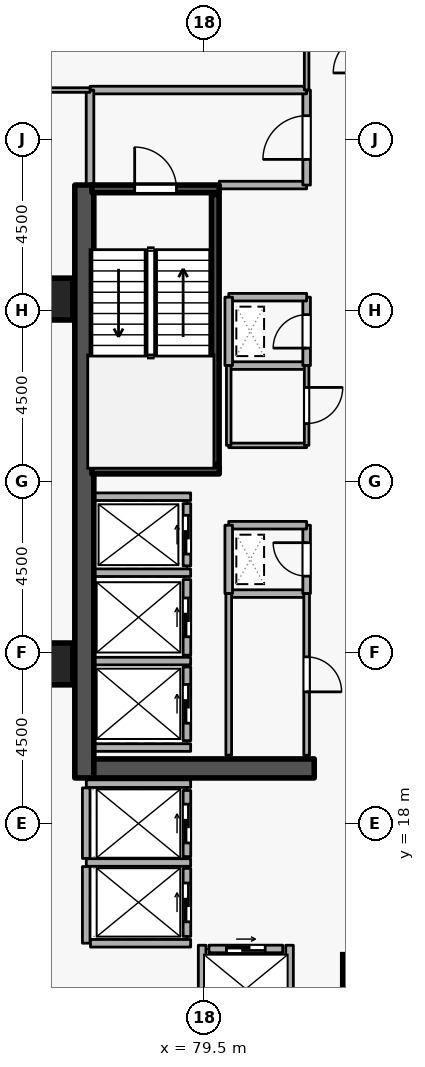
"""IFC4 building model, lengths in metres.
Left out: names, types, materials, properties, quantities, classifications, styles, units other than length and angle.
Written with IfcOpenShell. Run it as: python <this file> out.ifc"""

import sys

from ifc_helpers import new_model, si_unit, direction, frame, frame_2d, origin, origin_2d, place, context, subcontext, project, spatial, rectangle, extrude, element, fill, save


model = new_model("IFC4")
c1 = context("Model", 3, precision=1e-05, world=origin(), true_north=direction((0.0, 1.0)))
c2 = subcontext(c1, "Body", "Model", "MODEL_VIEW")
j1 = project(units=[si_unit("LENGTHUNIT", "METRE"), si_unit("PLANEANGLEUNIT", "RADIAN")], contexts=[c1])
p1 = place(None, origin())
s1 = spatial("IfcSite", under=j1, at=p1, CompositionType="ELEMENT")
p2 = place(p1, origin())
s2 = spatial("IfcBuilding", under=s1, at=p2, CompositionType="ELEMENT")
p3 = place(p2, frame((0.0, 0.0, 192.9)))
s3 = spatial("IfcBuildingStorey", under=s2, at=p3, CompositionType="ELEMENT", Elevation=192.9)
p4 = place(p3, frame((76.35, 19.2, 0.0), z_axis=(0.0, 0.0, 1.0), x_axis=(0.0, 1.0, 0.0)))
e1 = element("IfcWall", 1, at=p4, inside=s3, PredefinedType="SHEAR", context=c2, shape_type="SweptSolid", body=[
    extrude(rectangle(XDim=15.6, YDim=0.5, at=frame_2d((7.8, 0.0))), origin(), (0.0, 0.0, 1.0), 3.6),
])
p5 = place(p3, frame((76.6, 19.45, 0.0), z_axis=(0.0, 0.0, 1.0), x_axis=(1.0, 0.0, 0.0)))
e2 = element("IfcWall", 2, at=p5, inside=s3, PredefinedType="SHEAR", context=c2, shape_type="SweptSolid", body=[
    extrude(rectangle(XDim=5.8, YDim=0.5, at=frame_2d((2.9, 0.0))), origin(), (0.0, 0.0, 1.0), 3.6),
])
for number, where, z_axis, x_axis in (
    (3, (83.7, 14.0, 0.0), (0.0, 0.0, 1.0), (1.0, 0.0, 0.0)),
    (4, (75.5, 22.2, 0.0), (0.0, 0.0, 1.0), (1.0, 0.0, 0.0)),
    (5, (75.5, 31.8, 0.0), (0.0, 0.0, 1.0), (1.0, 0.0, 0.0)),
):
    element("IfcColumn", number, at=place(p3, frame(where, z_axis=z_axis, x_axis=x_axis)), inside=s3, PredefinedType="COLUMN", context=c2, shape_type="SweptSolid", body=[
        extrude(rectangle(XDim=1.1, YDim=1.1, at=origin_2d()), origin(), (0.0, 0.0, 1.0), 3.6),
    ])
p6 = place(p3, frame((79.05, 24.78, 0.0), z_axis=(0.0, 0.0, 1.0), x_axis=(0.0, 1.0, 0.0)))
e6 = element("IfcWall", 6, at=p6, inside=s3, PredefinedType="STANDARD", context=c2, shape_type="SweptSolid", body=[
    extrude(rectangle(XDim=1.64, YDim=0.2, at=frame_2d((0.82, 0.0))), origin(), (0.0, 0.0, 1.0), 3.34),
])
p7 = place(p6, frame((0.31, 0.0, 0.0)))
e7 = element("IfcOpeningElement", 7, at=p7, cuts=e6, PredefinedType="OPENING", context=c2, shape_type="SweptSolid", body=[
    extrude(rectangle(XDim=1.02, YDim=2.06, at=frame_2d((0.51, 1.03))), frame((0.0, 0.11, 0.0), z_axis=(0.0, -1.0, 0.0), x_axis=(1.0, 0.0, 0.0)), (0.0, 0.0, 1.0), 0.22),
])
p8 = place(p3, frame((79.05, 22.43, 0.0), z_axis=(0.0, 0.0, 1.0), x_axis=(0.0, 1.0, 0.0)))
e8 = element("IfcWall", 8, at=p8, inside=s3, PredefinedType="STANDARD", context=c2, shape_type="SweptSolid", body=[
    extrude(rectangle(XDim=1.99, YDim=0.2, at=frame_2d((0.995, 0.0))), origin(), (0.0, 0.0, 1.0), 3.34),
])
p9 = place(p8, frame((0.485, 0.0, 0.0)))
e9 = element("IfcOpeningElement", 9, at=p9, cuts=e8, PredefinedType="OPENING", context=c2, shape_type="SweptSolid", body=[
    extrude(rectangle(XDim=1.02, YDim=2.06, at=frame_2d((0.51, 1.03))), frame((0.0, 0.11, 0.0), z_axis=(0.0, -1.0, 0.0), x_axis=(1.0, 0.0, 0.0)), (0.0, 0.0, 1.0), 0.22),
])
p10 = place(p3, frame((79.05, 20.18, 0.0), z_axis=(0.0, 0.0, 1.0), x_axis=(0.0, 1.0, 0.0)))
e10 = element("IfcWall", 10, at=p10, inside=s3, PredefinedType="STANDARD", context=c2, shape_type="SweptSolid", body=[
    extrude(rectangle(XDim=1.94, YDim=0.2, at=frame_2d((0.97, 0.0))), origin(), (0.0, 0.0, 1.0), 3.34),
])
p11 = place(p10, frame((0.46, 0.0, 0.0)))
e11 = element("IfcOpeningElement", 11, at=p11, cuts=e10, PredefinedType="OPENING", context=c2, shape_type="SweptSolid", body=[
    extrude(rectangle(XDim=1.02, YDim=2.06, at=frame_2d((0.51, 1.03))), frame((0.0, 0.11, 0.0), z_axis=(0.0, -1.0, 0.0), x_axis=(1.0, 0.0, 0.0)), (0.0, 0.0, 1.0), 0.22),
])
p12 = place(p3, frame((79.05, 17.13, 0.0), z_axis=(0.0, 0.0, 1.0), x_axis=(0.0, 1.0, 0.0)))
e12 = element("IfcWall", 12, at=p12, inside=s3, PredefinedType="STANDARD", context=c2, shape_type="SweptSolid", body=[
    extrude(rectangle(XDim=1.74, YDim=0.2, at=frame_2d((0.87, 0.0))), origin(), (0.0, 0.0, 1.0), 3.34),
])
p13 = place(p12, frame((0.36, 0.0, 0.0)))
e13 = element("IfcOpeningElement", 13, at=p13, cuts=e12, PredefinedType="OPENING", context=c2, shape_type="SweptSolid", body=[
    extrude(rectangle(XDim=1.02, YDim=2.06, at=frame_2d((0.51, 1.03))), frame((0.0, 0.11, 0.0), z_axis=(0.0, -1.0, 0.0), x_axis=(1.0, 0.0, 0.0)), (0.0, 0.0, 1.0), 0.22),
])
p14 = place(p3, frame((79.05, 15.03, 0.0), z_axis=(0.0, 0.0, 1.0), x_axis=(0.0, 1.0, 0.0)))
e14 = element("IfcWall", 14, at=p14, inside=s3, PredefinedType="STANDARD", context=c2, shape_type="SweptSolid", body=[
    extrude(rectangle(XDim=1.79, YDim=0.2, at=frame_2d((0.895, 0.0))), origin(), (0.0, 0.0, 1.0), 3.34),
])
p15 = place(p14, frame((0.385, 0.0, 0.0)))
e15 = element("IfcOpeningElement", 15, at=p15, cuts=e14, PredefinedType="OPENING", context=c2, shape_type="SweptSolid", body=[
    extrude(rectangle(XDim=1.02, YDim=2.06, at=frame_2d((0.51, 1.03))), frame((0.0, 0.11, 0.0), z_axis=(0.0, -1.0, 0.0), x_axis=(1.0, 0.0, 0.0)), (0.0, 0.0, 1.0), 0.22),
])
p16 = place(p3, frame((79.63, 14.7, 0.0), z_axis=(0.0, 0.0, 1.0), x_axis=(1.0, 0.0, 0.0)))
e16 = element("IfcWall", 16, at=p16, inside=s3, PredefinedType="STANDARD", context=c2, shape_type="SweptSolid", body=[
    extrude(rectangle(XDim=1.94, YDim=0.2, at=frame_2d((0.97, 0.0))), origin(), (0.0, 0.0, 1.0), 3.34),
])
p17 = place(p16, frame((0.46, 0.0, 0.0)))
e17 = element("IfcOpeningElement", 17, at=p17, cuts=e16, PredefinedType="OPENING", context=c2, shape_type="SweptSolid", body=[
    extrude(rectangle(XDim=1.02, YDim=2.06, at=frame_2d((0.51, 1.03))), frame((0.0, 0.11, 0.0), z_axis=(0.0, -1.0, 0.0), x_axis=(1.0, 0.0, 0.0)), (0.0, 0.0, 1.0), 0.22),
])
for number, where, z_axis, x_axis in (
    (18, (76.612, 26.6, 0.0), (0.0, 0.0, 1.0), (1.0, 0.0, 0.0)),
    (19, (76.612, 24.6, 0.0), (0.0, 0.0, 1.0), (1.0, 0.0, 0.0)),
    (20, (76.612, 22.275, 0.0), (0.0, 0.0, 1.0), (1.0, 0.0, 0.0)),
    (21, (76.612, 20.0, 0.0), (0.0, 0.0, 1.0), (1.0, 0.0, 0.0)),
):
    element("IfcWall", number, at=place(p3, frame(where, z_axis=z_axis, x_axis=x_axis)), inside=s3, PredefinedType="STANDARD", context=c2, shape_type="SweptSolid", body=[
        extrude(rectangle(XDim=2.536, YDim=0.2, at=frame_2d((1.268, 0.0))), origin(), (0.0, 0.0, 1.0), 3.34),
    ])
p18 = place(p3, frame((76.402, 19.05, 0.0), z_axis=(0.0, 0.0, 1.0), x_axis=(1.0, 0.0, 0.0)))
e22 = element("IfcWall", 22, at=p18, inside=s3, PredefinedType="STANDARD", context=c2, shape_type="SweptSolid", body=[
    extrude(rectangle(XDim=2.746, YDim=0.2, at=frame_2d((1.373, 0.0))), origin(), (0.0, 0.0, 1.0), 2.545),
])
p19 = place(p3, frame((76.402, 16.975, 0.0), z_axis=(0.0, 0.0, 1.0), x_axis=(1.0, 0.0, 0.0)))
e23 = element("IfcWall", 23, at=p19, inside=s3, PredefinedType="STANDARD", context=c2, shape_type="SweptSolid", body=[
    extrude(rectangle(XDim=2.746, YDim=0.2, at=frame_2d((1.373, 0.0))), origin(), (0.0, 0.0, 1.0), 3.34),
])
p20 = place(p3, frame((76.4, 14.852, 0.0), z_axis=(0.0, 0.0, 1.0), x_axis=(0.0, 1.0, 0.0)))
e24 = element("IfcWall", 24, at=p20, inside=s3, PredefinedType="STANDARD", context=c2, shape_type="SweptSolid", body=[
    extrude(rectangle(XDim=2.016, YDim=0.2, at=frame_2d((1.008, 0.0))), origin(), (0.0, 0.0, 1.0), 3.34),
])
p21 = place(p3, frame((76.4, 17.082, 0.0), z_axis=(0.0, 0.0, 1.0), x_axis=(0.0, 1.0, 0.0)))
e25 = element("IfcWall", 25, at=p21, inside=s3, PredefinedType="STANDARD", context=c2, shape_type="SweptSolid", body=[
    extrude(rectangle(XDim=1.856, YDim=0.2, at=frame_2d((0.928, 0.0))), origin(), (0.0, 0.0, 1.0), 3.34),
])
p22 = place(p3, frame((76.512, 14.85, 0.0), z_axis=(0.0, 0.0, 1.0), x_axis=(1.0, 0.0, 0.0)))
e26 = element("IfcWall", 26, at=p22, inside=s3, PredefinedType="STANDARD", context=c2, shape_type="SweptSolid", body=[
    extrude(rectangle(XDim=2.636, YDim=0.2, at=frame_2d((1.318, 0.0))), origin(), (0.0, 0.0, 1.0), 3.34),
])
for number, where, z_axis, x_axis in (
    (27, (81.75, 12.612, 0.0), (0.0, 0.0, 1.0), (0.0, 1.0, 0.0)),
    (28, (79.45, 12.612, 0.0), (0.0, 0.0, 1.0), (0.0, 1.0, 0.0)),
):
    element("IfcWall", number, at=place(p3, frame(where, z_axis=z_axis, x_axis=x_axis)), inside=s3, PredefinedType="STANDARD", context=c2, shape_type="SweptSolid", body=[
        extrude(rectangle(XDim=2.186, YDim=0.2, at=frame_2d((1.093, 0.0))), origin(), (0.0, 0.0, 1.0), 3.34),
    ])
p23 = place(p3, frame((76.55, 34.7, 0.0), z_axis=(0.0, 0.0, 1.0), x_axis=(1.0, 0.0, 0.0)))
e29 = element("IfcWall", 29, at=p23, inside=s3, PredefinedType="SHEAR", context=c2, shape_type="SweptSolid", body=[
    extrude(rectangle(XDim=3.35, YDim=0.2, at=frame_2d((1.675, 0.0))), origin(), (0.0, 0.0, 1.0), 3.6),
])
p24 = place(p23, frame((1.125, 0.0, 0.0)))
e30 = element("IfcOpeningElement", 30, at=p24, cuts=e29, PredefinedType="OPENING", context=c2, shape_type="SweptSolid", body=[
    extrude(rectangle(XDim=1.1, YDim=2.1, at=frame_2d((0.55, 1.05))), frame((0.0, 0.11, 0.0), z_axis=(0.0, -1.0, 0.0), x_axis=(1.0, 0.0, 0.0)), (0.0, 0.0, 1.0), 0.22),
])
p25 = place(p3, frame((79.9, 27.3, 0.0), z_axis=(0.0, 0.0, 1.0), x_axis=(-1.0, 0.0, 0.0)))
e31 = element("IfcWall", 31, at=p25, inside=s3, PredefinedType="SHEAR", context=c2, shape_type="SweptSolid", body=[
    extrude(rectangle(XDim=3.35, YDim=0.2, at=frame_2d((1.675, 0.0))), origin(), (0.0, 0.0, 1.0), 3.6),
])
p26 = place(p3, frame((79.797, 27.45, 0.0), z_axis=(0.0, 0.0, 1.0), x_axis=(0.0, 1.0, 0.0)))
e32 = element("IfcWall", 32, at=p26, inside=s3, PredefinedType="SHEAR", context=c2, shape_type="SweptSolid", body=[
    extrude(rectangle(XDim=7.1, YDim=0.2, at=frame_2d((3.55, 0.0))), origin(), (0.0, 0.0, 1.0), 3.6),
])
p27 = place(p3, frame((79.9, 34.8, 0.0), z_axis=(0.0, 0.0, 1.0), x_axis=(1.0, 0.0, 0.0)))
e33 = element("IfcWall", 33, at=p27, inside=s3, PredefinedType="STANDARD", context=c2, shape_type="SweptSolid", body=[
    extrude(rectangle(XDim=2.3, YDim=0.2, at=frame_2d((1.15, 0.0))), origin(), (0.0, 0.0, 1.0), 2.545),
])
p28 = place(p3, frame((82.2, 34.8, 0.0), z_axis=(0.0, 0.0, 1.0), x_axis=(0.0, 1.0, 0.0)))
e34 = element("IfcWall", 34, at=p28, inside=s3, PredefinedType="STANDARD", context=c2, shape_type="SweptSolid", body=[
    extrude(rectangle(XDim=2.5, YDim=0.2, at=frame_2d((1.25, 0.0))), origin(), (0.0, 0.0, 1.0), 3.34),
])
p29 = place(p28, frame((0.675, 0.0, 0.0)))
e35 = element("IfcOpeningElement", 35, at=p29, cuts=e34, PredefinedType="OPENING", context=c2, shape_type="SweptSolid", body=[
    extrude(rectangle(XDim=1.15, YDim=2.1, at=frame_2d((0.575, 1.05))), frame((0.0, 0.11, 0.0), z_axis=(0.0, -1.0, 0.0), x_axis=(1.0, 0.0, 0.0)), (0.0, 0.0, 1.0), 0.22),
])
p30 = place(p3, frame((82.2, 37.3, 0.0), z_axis=(0.0, 0.0, 1.0), x_axis=(-1.0, 0.0, 0.0)))
e36 = element("IfcWall", 36, at=p30, inside=s3, PredefinedType="STANDARD", context=c2, shape_type="SweptSolid", body=[
    extrude(rectangle(XDim=5.7, YDim=0.2, at=frame_2d((2.85, 0.0))), origin(), (0.0, 0.0, 1.0), 3.34),
])
p31 = place(p3, frame((76.5, 37.3, 0.0), z_axis=(0.0, 0.0, 1.0), x_axis=(0.0, -1.0, 0.0)))
e37 = element("IfcWall", 37, at=p31, inside=s3, PredefinedType="STANDARD", context=c2, shape_type="SweptSolid", body=[
    extrude(rectangle(XDim=2.5, YDim=0.2, at=frame_2d((1.25, 0.0))), origin(), (0.0, 0.0, 1.0), 3.34),
])
p32 = place(p3, frame((80.15, 24.05, 0.0), z_axis=(0.0, 0.0, 1.0), x_axis=(1.0, 0.0, 0.0)))
e38 = element("IfcWall", 38, at=p32, inside=s3, PredefinedType="STANDARD", context=c2, shape_type="SweptSolid", body=[
    extrude(rectangle(XDim=2.05, YDim=0.2, at=frame_2d((1.025, 0.0))), origin(), (0.0, 0.0, 1.0), 3.34),
])
p33 = place(p3, frame((82.2, 24.05, 0.0), z_axis=(0.0, 0.0, 1.0), x_axis=(0.0, 1.0, 0.0)))
e39 = element("IfcWall", 39, at=p33, inside=s3, PredefinedType="STANDARD", context=c2, shape_type="SweptSolid", body=[
    extrude(rectangle(XDim=1.8, YDim=0.2, at=frame_2d((0.9, 0.0))), origin(), (0.0, 0.0, 1.0), 3.34),
])
p34 = place(p33, frame((0.46, 0.0, 0.0)))
e40 = element("IfcOpeningElement", 40, at=p34, cuts=e39, PredefinedType="OPENING", context=c2, shape_type="SweptSolid", body=[
    extrude(rectangle(XDim=0.88, YDim=2.04, at=frame_2d((0.44, 1.02))), frame((0.0, 0.11, 0.0), z_axis=(0.0, -1.0, 0.0), x_axis=(1.0, 0.0, 0.0)), (0.0, 0.0, 1.0), 0.22),
])
p35 = place(p3, frame((82.2, 25.85, 0.0), z_axis=(0.0, 0.0, 1.0), x_axis=(-1.0, 0.0, 0.0)))
e41 = element("IfcWall", 41, at=p35, inside=s3, PredefinedType="STANDARD", context=c2, shape_type="SweptSolid", body=[
    extrude(rectangle(XDim=2.05, YDim=0.2, at=frame_2d((1.025, 0.0))), origin(), (0.0, 0.0, 1.0), 3.34),
])
p36 = place(p3, frame((80.15, 25.85, 0.0), z_axis=(0.0, 0.0, 1.0), x_axis=(0.0, -1.0, 0.0)))
e42 = element("IfcWall", 42, at=p36, inside=s3, PredefinedType="STANDARD", context=c2, shape_type="SweptSolid", body=[
    extrude(rectangle(XDim=1.8, YDim=0.2, at=frame_2d((0.9, 0.0))), origin(), (0.0, 0.0, 1.0), 3.34),
])
p37 = place(p3, frame((80.15, 30.05, 0.0), z_axis=(0.0, 0.0, 1.0), x_axis=(1.0, 0.0, 0.0)))
e43 = element("IfcWall", 43, at=p37, inside=s3, PredefinedType="STANDARD", context=c2, shape_type="SweptSolid", body=[
    extrude(rectangle(XDim=2.05, YDim=0.2, at=frame_2d((1.025, 0.0))), origin(), (0.0, 0.0, 1.0), 3.34),
])
p38 = place(p3, frame((82.2, 30.05, 0.0), z_axis=(0.0, 0.0, 1.0), x_axis=(0.0, 1.0, 0.0)))
e44 = element("IfcWall", 44, at=p38, inside=s3, PredefinedType="STANDARD", context=c2, shape_type="SweptSolid", body=[
    extrude(rectangle(XDim=1.8, YDim=0.2, at=frame_2d((0.9, 0.0))), origin(), (0.0, 0.0, 1.0), 3.34),
])
p39 = place(p38, frame((0.46, 0.0, 0.0)))
e45 = element("IfcOpeningElement", 45, at=p39, cuts=e44, PredefinedType="OPENING", context=c2, shape_type="SweptSolid", body=[
    extrude(rectangle(XDim=0.88, YDim=2.04, at=frame_2d((0.44, 1.02))), frame((0.0, 0.11, 0.0), z_axis=(0.0, -1.0, 0.0), x_axis=(1.0, 0.0, 0.0)), (0.0, 0.0, 1.0), 0.22),
])
p40 = place(p3, frame((82.2, 31.85, 0.0), z_axis=(0.0, 0.0, 1.0), x_axis=(-1.0, 0.0, 0.0)))
e46 = element("IfcWall", 46, at=p40, inside=s3, PredefinedType="STANDARD", context=c2, shape_type="SweptSolid", body=[
    extrude(rectangle(XDim=2.05, YDim=0.2, at=frame_2d((1.025, 0.0))), origin(), (0.0, 0.0, 1.0), 3.34),
])
p41 = place(p3, frame((80.15, 31.85, 0.0), z_axis=(0.0, 0.0, 1.0), x_axis=(0.0, -1.0, 0.0)))
e47 = element("IfcWall", 47, at=p41, inside=s3, PredefinedType="STANDARD", context=c2, shape_type="SweptSolid", body=[
    extrude(rectangle(XDim=1.8, YDim=0.2, at=frame_2d((0.9, 0.0))), origin(), (0.0, 0.0, 1.0), 3.34),
])
p42 = place(p3, frame((80.15, 19.8, 0.0), z_axis=(0.0, 0.0, 1.0), x_axis=(0.0, 1.0, 0.0)))
e48 = element("IfcWall", 48, at=p42, inside=s3, PredefinedType="PARTITIONING", context=c2, shape_type="SweptSolid", body=[
    extrude(rectangle(XDim=4.25, YDim=0.15, at=frame_2d((2.125, 0.0))), origin(), (0.0, 0.0, 1.0), 3.34),
])
p43 = place(p3, frame((82.2, 24.05, 0.0), z_axis=(0.0, 0.0, 1.0), x_axis=(0.0, -1.0, 0.0)))
e49 = element("IfcWall", 49, at=p43, inside=s3, PredefinedType="PARTITIONING", context=c2, shape_type="SweptSolid", body=[
    extrude(rectangle(XDim=4.25, YDim=0.15, at=frame_2d((2.125, 0.0))), origin(), (0.0, 0.0, 1.0), 3.34),
])
p44 = place(p43, frame((1.665, 0.0, 0.0)))
e50 = element("IfcOpeningElement", 50, at=p44, cuts=e49, PredefinedType="OPENING", context=c2, shape_type="SweptSolid", body=[
    extrude(rectangle(XDim=0.92, YDim=2.08, at=frame_2d((0.46, 1.04))), frame((0.0, 0.085, 0.0), z_axis=(0.0, -1.0, 0.0), x_axis=(1.0, 0.0, 0.0)), (0.0, 0.0, 1.0), 0.17),
])
p45 = place(p3, frame((82.2, 27.95, 0.0), z_axis=(0.0, 0.0, 1.0), x_axis=(-1.0, 0.0, 0.0)))
e51 = element("IfcWall", 51, at=p45, inside=s3, PredefinedType="PARTITIONING", context=c2, shape_type="SweptSolid", body=[
    extrude(rectangle(XDim=2.05, YDim=0.12, at=frame_2d((1.025, 0.0))), origin(), (0.0, 0.0, 1.0), 3.34),
])
p46 = place(p3, frame((80.15, 27.95, 0.0), z_axis=(0.0, 0.0, 1.0), x_axis=(0.0, 1.0, 0.0)))
e52 = element("IfcWall", 52, at=p46, inside=s3, PredefinedType="PARTITIONING", context=c2, shape_type="SweptSolid", body=[
    extrude(rectangle(XDim=2.1, YDim=0.12, at=frame_2d((1.05, 0.0))), origin(), (0.0, 0.0, 1.0), 3.34),
])
p47 = place(p3, frame((82.2, 30.05, 0.0), z_axis=(0.0, 0.0, 1.0), x_axis=(0.0, -1.0, 0.0)))
e53 = element("IfcWall", 53, at=p47, inside=s3, PredefinedType="PARTITIONING", context=c2, shape_type="SweptSolid", body=[
    extrude(rectangle(XDim=2.1, YDim=0.12, at=frame_2d((1.05, 0.0))), origin(), (0.0, 0.0, 1.0), 3.34),
])
p48 = place(p47, frame((0.575, 0.0, 0.0)))
e54 = element("IfcOpeningElement", 54, at=p48, cuts=e53, PredefinedType="OPENING", context=c2, shape_type="SweptSolid", body=[
    extrude(rectangle(XDim=0.95, YDim=2.1, at=frame_2d((0.475, 1.05))), frame((0.0, 0.07, 0.0), z_axis=(0.0, -1.0, 0.0), x_axis=(1.0, 0.0, 0.0)), (0.0, 0.0, 1.0), 0.14),
])
p49 = place(p3, frame((82.2, 39.25, 0.0), z_axis=(0.0, 0.0, 1.0), x_axis=(0.0, -1.0, 0.0)))
e55 = element("IfcWall", 55, at=p49, inside=s3, PredefinedType="PARTITIONING", context=c2, shape_type="SweptSolid", body=[
    extrude(rectangle(XDim=1.95, YDim=0.12, at=frame_2d((0.975, 0.0))), origin(), (0.0, 0.0, 1.0), 3.34),
])
p50 = place(p3, frame((76.5, 37.3, 0.0), z_axis=(0.0, 0.0, 1.0), x_axis=(-1.0, 0.0, 0.0)))
e56 = element("IfcWall", 56, at=p50, inside=s3, PredefinedType="PARTITIONING", context=c2, shape_type="SweptSolid", body=[
    extrude(rectangle(XDim=11.72, YDim=0.12, at=frame_2d((5.86, 0.0))), origin(), (0.0, 0.0, 1.0), 3.34),
])
p51 = place(p7, origin())
e57 = element("IfcDoor", 57, at=p51, inside=s3, OperationType="SLIDING_TO_LEFT", PredefinedType="DOOR", context=c2, shape_type="SweptSolid", body=[
    extrude(rectangle(XDim=1.02, YDim=2.06, at=frame_2d((0.51, 1.03))), frame((0.0, 0.025, 0.0), z_axis=(0.0, -1.0, 0.0), x_axis=(1.0, 0.0, 0.0)), (0.0, 0.0, 1.0), 0.05),
])
fill(e7, e57)
p52 = place(p9, origin())
e58 = element("IfcDoor", 58, at=p52, inside=s3, OperationType="SLIDING_TO_LEFT", PredefinedType="DOOR", context=c2, shape_type="SweptSolid", body=[
    extrude(rectangle(XDim=1.02, YDim=2.06, at=frame_2d((0.51, 1.03))), frame((0.0, 0.025, 0.0), z_axis=(0.0, -1.0, 0.0), x_axis=(1.0, 0.0, 0.0)), (0.0, 0.0, 1.0), 0.05),
])
fill(e9, e58)
p53 = place(p11, origin())
e59 = element("IfcDoor", 59, at=p53, inside=s3, OperationType="SLIDING_TO_LEFT", PredefinedType="DOOR", context=c2, shape_type="SweptSolid", body=[
    extrude(rectangle(XDim=1.02, YDim=2.06, at=frame_2d((0.51, 1.03))), frame((0.0, 0.025, 0.0), z_axis=(0.0, -1.0, 0.0), x_axis=(1.0, 0.0, 0.0)), (0.0, 0.0, 1.0), 0.05),
])
fill(e11, e59)
p54 = place(p13, origin())
e60 = element("IfcDoor", 60, at=p54, inside=s3, OperationType="SLIDING_TO_LEFT", PredefinedType="DOOR", context=c2, shape_type="SweptSolid", body=[
    extrude(rectangle(XDim=1.02, YDim=2.06, at=frame_2d((0.51, 1.03))), frame((0.0, 0.025, 0.0), z_axis=(0.0, -1.0, 0.0), x_axis=(1.0, 0.0, 0.0)), (0.0, 0.0, 1.0), 0.05),
])
fill(e13, e60)
p55 = place(p15, origin())
e61 = element("IfcDoor", 61, at=p55, inside=s3, OperationType="SLIDING_TO_LEFT", PredefinedType="DOOR", context=c2, shape_type="SweptSolid", body=[
    extrude(rectangle(XDim=1.02, YDim=2.06, at=frame_2d((0.51, 1.03))), frame((0.0, 0.025, 0.0), z_axis=(0.0, -1.0, 0.0), x_axis=(1.0, 0.0, 0.0)), (0.0, 0.0, 1.0), 0.05),
])
fill(e15, e61)
p56 = place(p17, origin())
e62 = element("IfcDoor", 62, at=p56, inside=s3, OperationType="SLIDING_TO_LEFT", PredefinedType="DOOR", context=c2, shape_type="SweptSolid", body=[
    extrude(rectangle(XDim=1.02, YDim=2.06, at=frame_2d((0.51, 1.03))), frame((0.0, 0.025, 0.0), z_axis=(0.0, -1.0, 0.0), x_axis=(1.0, 0.0, 0.0)), (0.0, 0.0, 1.0), 0.05),
])
fill(e17, e62)
p57 = place(p24, origin())
e63 = element("IfcDoor", 63, at=p57, inside=s3, OperationType="SINGLE_SWING_LEFT", PredefinedType="DOOR", context=c2, shape_type="SweptSolid", body=[
    extrude(rectangle(XDim=1.1, YDim=2.1, at=frame_2d((0.55, 1.05))), frame((0.0, 0.025, 0.0), z_axis=(0.0, -1.0, 0.0), x_axis=(1.0, 0.0, 0.0)), (0.0, 0.0, 1.0), 0.05),
])
fill(e30, e63)
p58 = place(p29, origin())
e64 = element("IfcDoor", 64, at=p58, inside=s3, OperationType="SINGLE_SWING_LEFT", PredefinedType="DOOR", context=c2, shape_type="SweptSolid", body=[
    extrude(rectangle(XDim=1.15, YDim=2.1, at=frame_2d((0.575, 1.05))), frame((0.0, 0.025, 0.0), z_axis=(0.0, -1.0, 0.0), x_axis=(1.0, 0.0, 0.0)), (0.0, 0.0, 1.0), 0.05),
])
fill(e35, e64)
p59 = place(p34, origin())
e65 = element("IfcDoor", 65, at=p59, inside=s3, OperationType="SINGLE_SWING_RIGHT", PredefinedType="DOOR", context=c2, shape_type="SweptSolid", body=[
    extrude(rectangle(XDim=0.88, YDim=2.04, at=frame_2d((0.44, 1.02))), frame((0.0, 0.025, 0.0), z_axis=(0.0, -1.0, 0.0), x_axis=(1.0, 0.0, 0.0)), (0.0, 0.0, 1.0), 0.05),
])
fill(e40, e65)
p60 = place(p39, origin())
e66 = element("IfcDoor", 66, at=p60, inside=s3, OperationType="SINGLE_SWING_LEFT", PredefinedType="DOOR", context=c2, shape_type="SweptSolid", body=[
    extrude(rectangle(XDim=0.88, YDim=2.04, at=frame_2d((0.44, 1.02))), frame((0.0, 0.025, 0.0), z_axis=(0.0, -1.0, 0.0), x_axis=(1.0, 0.0, 0.0)), (0.0, 0.0, 1.0), 0.05),
])
fill(e45, e66)
p61 = place(p44, origin())
e67 = element("IfcDoor", 67, at=p61, inside=s3, OperationType="SINGLE_SWING_RIGHT", PredefinedType="DOOR", context=c2, shape_type="SweptSolid", body=[
    extrude(rectangle(XDim=0.92, YDim=2.08, at=frame_2d((0.46, 1.04))), frame((0.0, 0.025, 0.0), z_axis=(0.0, -1.0, 0.0), x_axis=(1.0, 0.0, 0.0)), (0.0, 0.0, 1.0), 0.05),
])
fill(e50, e67)
p62 = place(p48, origin())
e68 = element("IfcDoor", 68, at=p62, inside=s3, OperationType="SINGLE_SWING_LEFT", PredefinedType="DOOR", context=c2, shape_type="SweptSolid", body=[
    extrude(rectangle(XDim=0.95, YDim=2.1, at=frame_2d((0.475, 1.05))), frame((0.0, 0.025, 0.0), z_axis=(0.0, -1.0, 0.0), x_axis=(1.0, 0.0, 0.0)), (0.0, 0.0, 1.0), 0.05),
])
fill(e54, e68)
save(model, sys.argv[1])
